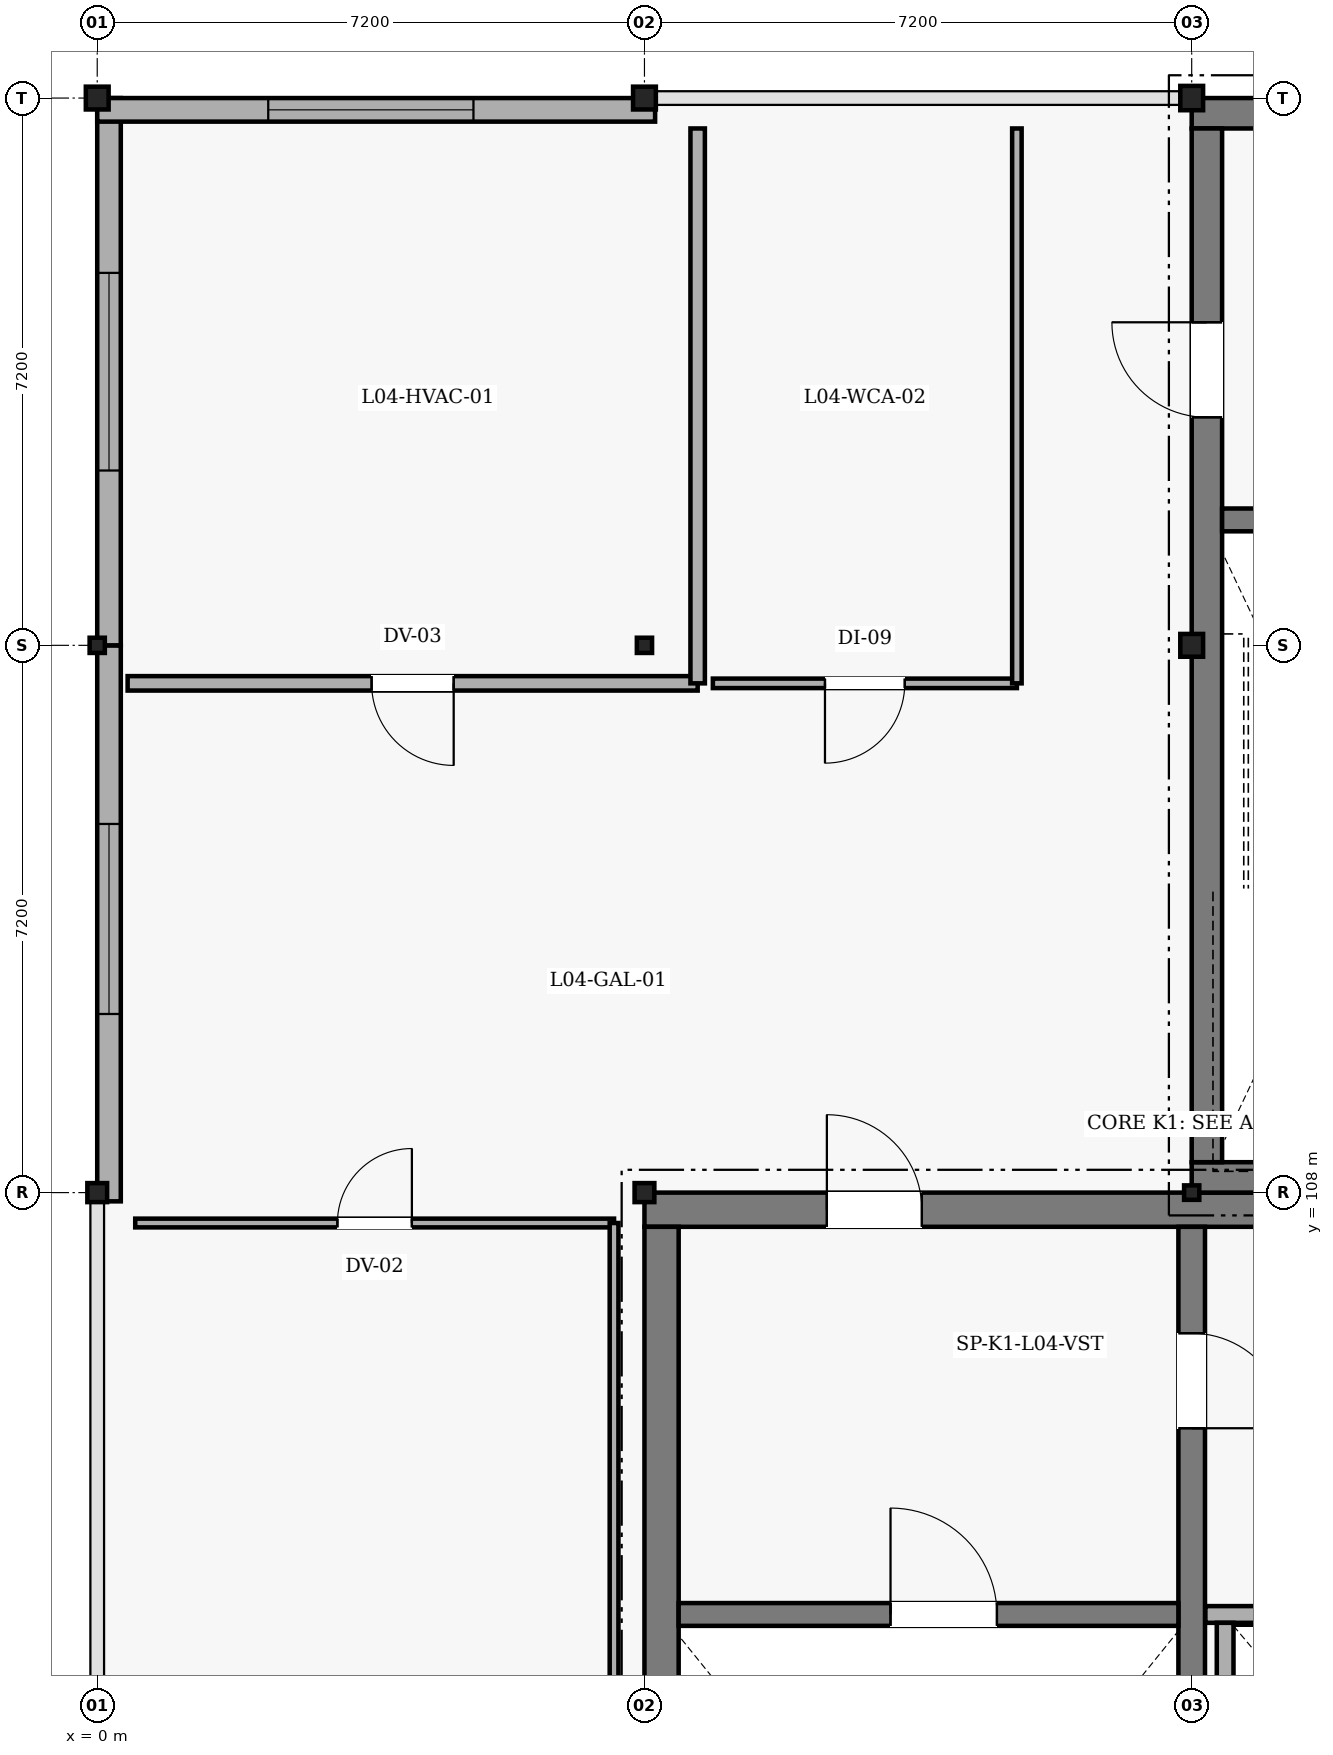
"""IFC4 building model, lengths in metres.
Left out: names, types, materials, properties, quantities, classifications, styles, units other than length and angle.
Written with IfcOpenShell. Run it as: python <this file> out.ifc"""

import sys

from ifc_helpers import new_model, si_unit, direction, frame, frame_2d, origin, origin_2d, place, context, subcontext, project, spatial, rectangle, hollow_rectangle, i_section, extrude, element, fill, save


model = new_model("IFC4")
c1 = context("Model", 3, precision=1e-05, world=origin(), true_north=direction((0.0, 1.0)))
c2 = subcontext(c1, "Body", "Model", "MODEL_VIEW")
j1 = project(units=[si_unit("LENGTHUNIT", "METRE"), si_unit("PLANEANGLEUNIT", "RADIAN")], contexts=[c1])
p1 = place(None, origin())
s1 = spatial("IfcSite", under=j1, at=p1, CompositionType="ELEMENT")
p2 = place(p1, origin())
s2 = spatial("IfcBuilding", under=s1, at=p2, CompositionType="ELEMENT")
p3 = place(p2, frame((0.0, 0.0, 18.0)))
s3 = spatial("IfcBuildingStorey", under=s2, at=p3, CompositionType="ELEMENT", Elevation=18.0)
p4 = place(p3, frame((7.2, 107.775, 0.0), z_axis=(0.0, 0.0, 1.0), x_axis=(1.0, 0.0, 0.0)))
e1 = element("IfcWall", 1, at=p4, inside=s3, PredefinedType="SHEAR", context=c2, shape_type="SweptSolid", body=[
    extrude(rectangle(XDim=14.4, YDim=0.45, at=frame_2d((7.2, 0.0))), origin(), (0.0, 0.0, 1.0), 3.6),
])
p5 = place(p4, frame((2.4, 0.0, 0.0)))
e2 = element("IfcOpeningElement", 2, at=p5, cuts=e1, PredefinedType="OPENING", context=c2, shape_type="SweptSolid", body=[
    extrude(rectangle(XDim=1.25, YDim=2.2, at=frame_2d((0.625, 1.1))), frame((0.0, 0.235, 0.0), z_axis=(0.0, -1.0, 0.0), x_axis=(1.0, 0.0, 0.0)), (0.0, 0.0, 1.0), 0.47),
])
p6 = place(p3, frame((7.425, 94.05, 0.0), z_axis=(0.0, 0.0, 1.0), x_axis=(0.0, 1.0, 0.0)))
e3 = element("IfcWall", 3, at=p6, inside=s3, PredefinedType="SHEAR", context=c2, shape_type="SweptSolid", body=[
    extrude(rectangle(XDim=13.5, YDim=0.45, at=frame_2d((6.75, 0.0))), origin(), (0.0, 0.0, 1.0), 3.6),
])
p7 = place(p3, frame((14.4, 107.55, 0.0), z_axis=(0.0, 0.0, 1.0), x_axis=(0.0, -1.0, 0.0)))
e4 = element("IfcWall", 4, at=p7, inside=s3, PredefinedType="SHEAR", context=c2, shape_type="SweptSolid", body=[
    extrude(rectangle(XDim=13.5, YDim=0.35, at=frame_2d((6.75, 0.0))), origin(), (0.0, 0.0, 1.0), 3.6),
])
p8 = place(p7, frame((1.4, 0.0, 0.0)))
e5 = element("IfcOpeningElement", 5, at=p8, cuts=e4, PredefinedType="OPENING", context=c2, shape_type="SweptSolid", body=[
    extrude(rectangle(XDim=1.25, YDim=2.2, at=frame_2d((0.625, 1.1))), frame((0.0, 0.185, 0.0), z_axis=(0.0, -1.0, 0.0), x_axis=(1.0, 0.0, 0.0)), (0.0, 0.0, 1.0), 0.37),
])
p9 = place(p3, frame((7.65, 102.45, 0.0), z_axis=(0.0, 0.0, 1.0), x_axis=(1.0, 0.0, 0.0)))
e6 = element("IfcWall", 6, at=p9, inside=s3, PredefinedType="SHEAR", context=c2, shape_type="SweptSolid", body=[
    extrude(rectangle(XDim=6.575, YDim=0.3, at=frame_2d((3.288, 0.0))), origin(), (0.0, 0.0, 1.0), 3.6),
])
p10 = place(p9, frame((2.788, 0.0, 0.0)))
e7 = element("IfcOpeningElement", 7, at=p10, cuts=e6, PredefinedType="OPENING", context=c2, shape_type="SweptSolid", body=[
    extrude(rectangle(XDim=1.4, YDim=2.2, at=frame_2d((0.7, 1.1))), frame((0.0, 0.16, 0.0), z_axis=(0.0, -1.0, 0.0), x_axis=(1.0, 0.0, 0.0)), (0.0, 0.0, 1.0), 0.32),
])
for number, where, z_axis, x_axis in (
    (8, (14.4, 122.2, 0.0), (0.0, 0.0, 1.0), (1.0, 0.0, 0.0)),
    (9, (21.6, 108.2, 0.0), (0.0, 0.0, 1.0), (-1.0, 0.0, 0.0)),
):
    element("IfcWall", number, at=place(p3, frame(where, z_axis=z_axis, x_axis=x_axis)), inside=s3, PredefinedType="SHEAR", context=c2, shape_type="SweptSolid", body=[
        extrude(rectangle(XDim=7.2, YDim=0.4, at=frame_2d((3.6, 0.0))), origin(), (0.0, 0.0, 1.0), 3.6),
    ])
p11 = place(p3, frame((14.6, 108.4, 0.0), z_axis=(0.0, 0.0, 1.0), x_axis=(0.0, 1.0, 0.0)))
e10 = element("IfcWall", 10, at=p11, inside=s3, PredefinedType="SHEAR", context=c2, shape_type="SweptSolid", body=[
    extrude(rectangle(XDim=13.6, YDim=0.4, at=frame_2d((6.8, 0.0))), origin(), (0.0, 0.0, 1.0), 3.6),
])
p12 = place(p11, frame((9.8, 0.0, 0.0)))
e11 = element("IfcOpeningElement", 11, at=p12, cuts=e10, PredefinedType="OPENING", context=c2, shape_type="SweptSolid", body=[
    extrude(rectangle(XDim=1.25, YDim=2.2, at=frame_2d((0.625, 1.1))), frame((0.0, 0.21, 0.0), z_axis=(0.0, -1.0, 0.0), x_axis=(1.0, 0.0, 0.0)), (0.0, 0.0, 1.0), 0.42),
])
p13 = place(p3, frame((14.8, 116.85, 0.0), z_axis=(0.0, 0.0, 1.0), x_axis=(1.0, 0.0, 0.0)))
e12 = element("IfcWall", 12, at=p13, inside=s3, PredefinedType="SHEAR", context=c2, shape_type="SweptSolid", body=[
    extrude(rectangle(XDim=6.4, YDim=0.3, at=frame_2d((3.2, 0.0))), origin(), (0.0, 0.0, 1.0), 3.6),
])
p14 = place(p13, frame((1.15, 0.0, 0.0)))
e13 = element("IfcOpeningElement", 13, at=p14, cuts=e12, PredefinedType="OPENING", context=c2, shape_type="SweptSolid", body=[
    extrude(rectangle(XDim=1.4, YDim=2.2, at=frame_2d((0.7, 1.1))), frame((0.0, 0.16, 0.0), z_axis=(0.0, -1.0, 0.0), x_axis=(1.0, 0.0, 0.0)), (0.0, 0.0, 1.0), 0.32),
])
p15 = place(p13, frame((4.6, 0.0, 0.0)))
e14 = element("IfcOpeningElement", 14, at=p15, cuts=e12, PredefinedType="OPENING", context=c2, shape_type="SweptSolid", body=[
    extrude(rectangle(XDim=1.2, YDim=2.15, at=frame_2d((0.6, 1.075))), frame((0.0, 0.16, 0.0), z_axis=(0.0, -1.0, 0.0), x_axis=(1.0, 0.0, 0.0)), (0.0, 0.0, 1.0), 0.32),
])
p16 = place(p3, frame((0.0, 108.0, 0.0), z_axis=(0.0, 0.0, 1.0), x_axis=(1.0, 0.0, 0.0)))
e15 = element("IfcColumn", 15, at=p16, inside=s3, PredefinedType="COLUMN", context=c2, shape_type="SweptSolid", body=[
    extrude(i_section(OverallWidth=0.26, OverallDepth=0.25, WebThickness=0.008, FlangeThickness=0.012, FilletRadius=0.024, at=origin_2d()), origin(), (0.0, 0.0, 1.0), 3.3),
])
p17 = place(p3, frame((0.0, 115.2, 0.0), z_axis=(0.0, 0.0, 1.0), x_axis=(1.0, 0.0, 0.0)))
e16 = element("IfcColumn", 16, at=p17, inside=s3, PredefinedType="COLUMN", context=c2, shape_type="SweptSolid", body=[
    extrude(i_section(OverallWidth=0.2, OverallDepth=0.2, WebThickness=0.009, FlangeThickness=0.015, FilletRadius=0.018, at=origin_2d()), origin(), (0.0, 0.0, 1.0), 3.3),
])
p18 = place(p3, frame((0.0, 122.4, 0.0), z_axis=(0.0, 0.0, 1.0), x_axis=(1.0, 0.0, 0.0)))
e17 = element("IfcColumn", 17, at=p18, inside=s3, PredefinedType="COLUMN", context=c2, shape_type="SweptSolid", body=[
    extrude(hollow_rectangle(XDim=0.3, YDim=0.3, WallThickness=0.012, at=origin_2d()), origin(), (0.0, 0.0, 1.0), 3.3),
])
p19 = place(p3, frame((7.2, 108.0, 0.0), z_axis=(0.0, 0.0, 1.0), x_axis=(1.0, 0.0, 0.0)))
e18 = element("IfcColumn", 18, at=p19, inside=s3, PredefinedType="COLUMN", context=c2, shape_type="SweptSolid", body=[
    extrude(i_section(OverallWidth=0.26, OverallDepth=0.25, WebThickness=0.008, FlangeThickness=0.012, FilletRadius=0.024, at=origin_2d()), origin(), (0.0, 0.0, 1.0), 3.3),
])
p20 = place(p3, frame((7.2, 115.2, 0.0), z_axis=(0.0, 0.0, 1.0), x_axis=(1.0, 0.0, 0.0)))
e19 = element("IfcColumn", 19, at=p20, inside=s3, PredefinedType="COLUMN", context=c2, shape_type="SweptSolid", body=[
    extrude(i_section(OverallWidth=0.2, OverallDepth=0.2, WebThickness=0.009, FlangeThickness=0.015, FilletRadius=0.018, at=origin_2d()), origin(), (0.0, 0.0, 1.0), 3.3),
])
p21 = place(p3, frame((7.2, 122.4, 0.0), z_axis=(0.0, 0.0, 1.0), x_axis=(1.0, 0.0, 0.0)))
e20 = element("IfcColumn", 20, at=p21, inside=s3, PredefinedType="COLUMN", context=c2, shape_type="SweptSolid", body=[
    extrude(hollow_rectangle(XDim=0.3, YDim=0.3, WallThickness=0.012, at=origin_2d()), origin(), (0.0, 0.0, 1.0), 3.3),
])
p22 = place(p3, frame((14.4, 108.0, 0.0), z_axis=(0.0, 0.0, 1.0), x_axis=(1.0, 0.0, 0.0)))
e21 = element("IfcColumn", 21, at=p22, inside=s3, PredefinedType="COLUMN", context=c2, shape_type="SweptSolid", body=[
    extrude(i_section(OverallWidth=0.2, OverallDepth=0.19, WebThickness=0.007, FlangeThickness=0.01, FilletRadius=0.018, at=origin_2d()), origin(), (0.0, 0.0, 1.0), 3.3),
])
p23 = place(p3, frame((14.4, 115.2, 0.0), z_axis=(0.0, 0.0, 1.0), x_axis=(1.0, 0.0, 0.0)))
e22 = element("IfcColumn", 22, at=p23, inside=s3, PredefinedType="COLUMN", context=c2, shape_type="SweptSolid", body=[
    extrude(hollow_rectangle(XDim=0.3, YDim=0.3, WallThickness=0.012, at=origin_2d()), origin(), (0.0, 0.0, 1.0), 3.3),
])
p24 = place(p3, frame((14.4, 122.4, 0.0), z_axis=(0.0, 0.0, 1.0), x_axis=(1.0, 0.0, 0.0)))
e23 = element("IfcColumn", 23, at=p24, inside=s3, PredefinedType="COLUMN", context=c2, shape_type="SweptSolid", body=[
    extrude(i_section(OverallWidth=0.3, OverallDepth=0.32, WebThickness=0.011, FlangeThickness=0.021, FilletRadius=0.027, at=origin_2d()), origin(), (0.0, 0.0, 1.0), 3.3),
])
p25 = place(p3, frame((0.155, 107.885, 0.0), z_axis=(0.0, 0.0, 1.0), x_axis=(0.0, 1.0, 0.0)))
e24 = element("IfcWall", 24, at=p25, inside=s3, PredefinedType="SOLIDWALL", context=c2, shape_type="SweptSolid", body=[
    extrude(rectangle(XDim=7.315, YDim=0.31, at=frame_2d((3.657, 0.0))), origin(), (0.0, 0.0, 1.0), 3.0),
])
p26 = place(p25, frame((2.465, 0.0, 0.9)))
e25 = element("IfcOpeningElement", 25, at=p26, cuts=e24, PredefinedType="OPENING", context=c2, shape_type="SweptSolid", body=[
    extrude(rectangle(XDim=2.5, YDim=1.75, at=frame_2d((1.25, 0.875))), frame((0.0, 0.165, 0.0), z_axis=(0.0, -1.0, 0.0), x_axis=(1.0, 0.0, 0.0)), (0.0, 0.0, 1.0), 0.33),
])
p27 = place(p3, frame((0.155, 115.2, 0.0), z_axis=(0.0, 0.0, 1.0), x_axis=(0.0, 1.0, 0.0)))
e26 = element("IfcWall", 26, at=p27, inside=s3, PredefinedType="SOLIDWALL", context=c2, shape_type="SweptSolid", body=[
    extrude(rectangle(XDim=7.2, YDim=0.31, at=frame_2d((3.6, 0.0))), origin(), (0.0, 0.0, 1.0), 3.0),
])
p28 = place(p27, frame((2.3, 0.0, 0.9)))
e27 = element("IfcOpeningElement", 27, at=p28, cuts=e26, PredefinedType="OPENING", context=c2, shape_type="SweptSolid", body=[
    extrude(rectangle(XDim=2.6, YDim=1.8, at=frame_2d((1.3, 0.9))), frame((0.0, 0.165, 0.0), z_axis=(0.0, -1.0, 0.0), x_axis=(1.0, 0.0, 0.0)), (0.0, 0.0, 1.0), 0.33),
])
p29 = place(p3, frame((0.0, 122.245, 0.0), z_axis=(0.0, 0.0, 1.0), x_axis=(1.0, 0.0, 0.0)))
e28 = element("IfcWall", 28, at=p29, inside=s3, PredefinedType="SOLIDWALL", context=c2, shape_type="SweptSolid", body=[
    extrude(rectangle(XDim=7.34, YDim=0.31, at=frame_2d((3.67, 0.0))), origin(), (0.0, 0.0, 1.0), 3.0),
])
p30 = place(p29, frame((2.25, 0.0, 0.9)))
e29 = element("IfcOpeningElement", 29, at=p30, cuts=e28, PredefinedType="OPENING", context=c2, shape_type="SweptSolid", body=[
    extrude(rectangle(XDim=2.7, YDim=1.65, at=frame_2d((1.35, 0.825))), frame((0.0, 0.165, 0.0), z_axis=(0.0, -1.0, 0.0), x_axis=(1.0, 0.0, 0.0)), (0.0, 0.0, 1.0), 0.33),
])
p31 = place(p3, frame((14.58, 102.45, 0.0), z_axis=(0.0, 0.0, 1.0), x_axis=(1.0, 0.0, 0.0)))
e30 = element("IfcWall", 30, at=p31, inside=s3, PredefinedType="PARTITIONING", context=c2, shape_type="SweptSolid", body=[
    extrude(rectangle(XDim=6.57, YDim=0.22, at=frame_2d((3.285, 0.0))), origin(), (0.0, 0.0, 1.0), 3.25),
])
p32 = place(p31, frame((1.02, 0.0, 0.0)))
e31 = element("IfcOpeningElement", 31, at=p32, cuts=e30, PredefinedType="OPENING", context=c2, shape_type="SweptSolid", body=[
    extrude(rectangle(XDim=1.1, YDim=2.15, at=frame_2d((0.55, 1.075))), frame((0.0, 0.12, 0.0), z_axis=(0.0, -1.0, 0.0), x_axis=(1.0, 0.0, 0.0)), (0.0, 0.0, 1.0), 0.24),
])
p33 = place(p31, frame((4.07, 0.0, 0.0)))
e32 = element("IfcOpeningElement", 32, at=p33, cuts=e30, PredefinedType="OPENING", context=c2, shape_type="SweptSolid", body=[
    extrude(rectangle(XDim=1.2, YDim=2.15, at=frame_2d((0.6, 1.075))), frame((0.0, 0.12, 0.0), z_axis=(0.0, -1.0, 0.0), x_axis=(1.0, 0.0, 0.0)), (0.0, 0.0, 1.0), 0.24),
])
p34 = place(p3, frame((14.84, 99.34, 0.0), z_axis=(0.0, 0.0, 1.0), x_axis=(0.0, 1.0, 0.0)))
e33 = element("IfcWall", 33, at=p34, inside=s3, PredefinedType="PARTITIONING", context=c2, shape_type="SweptSolid", body=[
    extrude(rectangle(XDim=3.0, YDim=0.22, at=frame_2d((1.5, 0.0))), origin(), (0.0, 0.0, 1.0), 3.25),
])
p35 = place(p3, frame((0.5, 107.6, 0.0), z_axis=(0.0, 0.0, 1.0), x_axis=(1.0, 0.0, 0.0)))
e34 = element("IfcWall", 34, at=p35, inside=s3, PredefinedType="PARTITIONING", context=c2, shape_type="SweptSolid", body=[
    extrude(rectangle(XDim=6.3, YDim=0.115, at=frame_2d((3.15, 0.0))), origin(), (0.0, 0.0, 1.0), 3.25),
])
p36 = place(p35, frame((2.66, 0.0, 0.0)))
e35 = element("IfcOpeningElement", 35, at=p36, cuts=e34, PredefinedType="OPENING", context=c2, shape_type="SweptSolid", body=[
    extrude(rectangle(XDim=0.98, YDim=2.15, at=frame_2d((0.49, 1.075))), frame((0.0, 0.067, 0.0), z_axis=(0.0, -1.0, 0.0), x_axis=(1.0, 0.0, 0.0)), (0.0, 0.0, 1.0), 0.135),
])
p37 = place(p3, frame((6.8, 107.6, 0.0), z_axis=(0.0, 0.0, 1.0), x_axis=(0.0, -1.0, 0.0)))
e36 = element("IfcWall", 36, at=p37, inside=s3, PredefinedType="PARTITIONING", context=c2, shape_type="SweptSolid", body=[
    extrude(rectangle(XDim=13.5, YDim=0.115, at=frame_2d((6.75, 0.0))), origin(), (0.0, 0.0, 1.0), 2.85),
])
p38 = place(p3, frame((7.9, 114.7, 0.0), z_axis=(0.0, 0.0, 1.0), x_axis=(-1.0, 0.0, 0.0)))
e37 = element("IfcWall", 37, at=p38, inside=s3, PredefinedType="PARTITIONING", context=c2, shape_type="SweptSolid", body=[
    extrude(rectangle(XDim=7.5, YDim=0.19, at=frame_2d((3.75, 0.0))), origin(), (0.0, 0.0, 1.0), 2.85),
])
p39 = place(p38, frame((3.21, 0.0, 0.0)))
e38 = element("IfcOpeningElement", 38, at=p39, cuts=e37, PredefinedType="OPENING", context=c2, shape_type="SweptSolid", body=[
    extrude(rectangle(XDim=1.08, YDim=2.15, at=frame_2d((0.54, 1.075))), frame((0.0, 0.105, 0.0), z_axis=(0.0, -1.0, 0.0), x_axis=(1.0, 0.0, 0.0)), (0.0, 0.0, 1.0), 0.21),
])
p40 = place(p3, frame((7.9, 122.0, 0.0), z_axis=(0.0, 0.0, 1.0), x_axis=(0.0, -1.0, 0.0)))
e39 = element("IfcWall", 39, at=p40, inside=s3, PredefinedType="PARTITIONING", context=c2, shape_type="SweptSolid", body=[
    extrude(rectangle(XDim=7.3, YDim=0.19, at=frame_2d((3.65, 0.0))), origin(), (0.0, 0.0, 1.0), 2.85),
])
p41 = place(p3, frame((12.1, 114.7, 0.0), z_axis=(0.0, 0.0, 1.0), x_axis=(-1.0, 0.0, 0.0)))
e40 = element("IfcWall", 40, at=p41, inside=s3, PredefinedType="PARTITIONING", context=c2, shape_type="SweptSolid", body=[
    extrude(rectangle(XDim=4.0, YDim=0.125, at=frame_2d((2.0, 0.0))), origin(), (0.0, 0.0, 1.0), 3.25),
])
p42 = place(p41, frame((1.475, 0.0, 0.0)))
e41 = element("IfcOpeningElement", 41, at=p42, cuts=e40, PredefinedType="OPENING", context=c2, shape_type="SweptSolid", body=[
    extrude(rectangle(XDim=1.05, YDim=2.1, at=frame_2d((0.525, 1.05))), frame((0.0, 0.073, 0.0), z_axis=(0.0, -1.0, 0.0), x_axis=(1.0, 0.0, 0.0)), (0.0, 0.0, 1.0), 0.145),
])
p43 = place(p3, frame((12.1, 122.0, 0.0), z_axis=(0.0, 0.0, 1.0), x_axis=(0.0, -1.0, 0.0)))
e42 = element("IfcWall", 42, at=p43, inside=s3, PredefinedType="PARTITIONING", context=c2, shape_type="SweptSolid", body=[
    extrude(rectangle(XDim=7.3, YDim=0.125, at=frame_2d((3.65, 0.0))), origin(), (0.0, 0.0, 1.0), 2.85),
])
p44 = place(p26, origin())
e43 = element("IfcWindow", 43, at=p44, inside=s3, PartitioningType="SINGLE_PANEL", PredefinedType="WINDOW", context=c2, shape_type="SweptSolid", body=[
    extrude(rectangle(XDim=2.5, YDim=1.75, at=frame_2d((1.25, 0.875))), frame((0.0, 0.03, 0.0), z_axis=(0.0, -1.0, 0.0), x_axis=(1.0, 0.0, 0.0)), (0.0, 0.0, 1.0), 0.06),
])
fill(e25, e43)
p45 = place(p28, origin())
e44 = element("IfcWindow", 44, at=p45, inside=s3, PartitioningType="SINGLE_PANEL", PredefinedType="WINDOW", context=c2, shape_type="SweptSolid", body=[
    extrude(rectangle(XDim=2.6, YDim=1.8, at=frame_2d((1.3, 0.9))), frame((0.0, 0.03, 0.0), z_axis=(0.0, -1.0, 0.0), x_axis=(1.0, 0.0, 0.0)), (0.0, 0.0, 1.0), 0.06),
])
fill(e27, e44)
p46 = place(p30, origin())
e45 = element("IfcWindow", 45, at=p46, inside=s3, PartitioningType="SINGLE_PANEL", PredefinedType="WINDOW", context=c2, shape_type="SweptSolid", body=[
    extrude(rectangle(XDim=2.7, YDim=1.65, at=frame_2d((1.35, 0.825))), frame((0.0, 0.03, 0.0), z_axis=(0.0, -1.0, 0.0), x_axis=(1.0, 0.0, 0.0)), (0.0, 0.0, 1.0), 0.06),
])
fill(e29, e45)
p47 = place(p10, origin())
e46 = element("IfcDoor", 46, at=p47, inside=s3, OperationType="SINGLE_SWING_LEFT", PredefinedType="DOOR", context=c2, shape_type="SweptSolid", body=[
    extrude(rectangle(XDim=1.4, YDim=2.2, at=frame_2d((0.7, 1.1))), frame((0.0, 0.025, 0.0), z_axis=(0.0, -1.0, 0.0), x_axis=(1.0, 0.0, 0.0)), (0.0, 0.0, 1.0), 0.05),
])
fill(e7, e46)
p48 = place(p8, origin())
e47 = element("IfcDoor", 47, at=p48, inside=s3, OperationType="SINGLE_SWING_RIGHT", PredefinedType="DOOR", context=c2, shape_type="SweptSolid", body=[
    extrude(rectangle(XDim=1.25, YDim=2.2, at=frame_2d((0.625, 1.1))), frame((0.0, 0.025, 0.0), z_axis=(0.0, -1.0, 0.0), x_axis=(1.0, 0.0, 0.0)), (0.0, 0.0, 1.0), 0.05),
])
fill(e5, e47)
p49 = place(p5, origin())
e48 = element("IfcDoor", 48, at=p49, inside=s3, OperationType="SINGLE_SWING_LEFT", PredefinedType="DOOR", context=c2, shape_type="SweptSolid", body=[
    extrude(rectangle(XDim=1.25, YDim=2.2, at=frame_2d((0.625, 1.1))), frame((0.0, 0.025, 0.0), z_axis=(0.0, -1.0, 0.0), x_axis=(1.0, 0.0, 0.0)), (0.0, 0.0, 1.0), 0.05),
])
fill(e2, e48)
p50 = place(p12, origin())
e49 = element("IfcDoor", 49, at=p50, inside=s3, OperationType="SINGLE_SWING_RIGHT", PredefinedType="DOOR", context=c2, shape_type="SweptSolid", body=[
    extrude(rectangle(XDim=1.25, YDim=2.2, at=frame_2d((0.625, 1.1))), frame((0.0, 0.025, 0.0), z_axis=(0.0, -1.0, 0.0), x_axis=(1.0, 0.0, 0.0)), (0.0, 0.0, 1.0), 0.05),
])
fill(e11, e49)
p51 = place(p36, origin())
e50 = element("IfcDoor", 50, at=p51, inside=s3, OperationType="SINGLE_SWING_RIGHT", PredefinedType="DOOR", context=c2, shape_type="SweptSolid", body=[
    extrude(rectangle(XDim=0.98, YDim=2.15, at=frame_2d((0.49, 1.075))), frame((0.0, 0.025, 0.0), z_axis=(0.0, -1.0, 0.0), x_axis=(1.0, 0.0, 0.0)), (0.0, 0.0, 1.0), 0.05),
])
fill(e35, e50)
p52 = place(p39, origin())
e51 = element("IfcDoor", 51, at=p52, inside=s3, OperationType="SINGLE_SWING_LEFT", PredefinedType="DOOR", context=c2, shape_type="SweptSolid", body=[
    extrude(rectangle(XDim=1.08, YDim=2.15, at=frame_2d((0.54, 1.075))), frame((0.0, 0.025, 0.0), z_axis=(0.0, -1.0, 0.0), x_axis=(1.0, 0.0, 0.0)), (0.0, 0.0, 1.0), 0.05),
])
fill(e38, e51)
p53 = place(p42, origin())
e52 = element("IfcDoor", 52, at=p53, inside=s3, OperationType="SINGLE_SWING_RIGHT", PredefinedType="DOOR", context=c2, shape_type="SweptSolid", body=[
    extrude(rectangle(XDim=1.05, YDim=2.1, at=frame_2d((0.525, 1.05))), frame((0.0, 0.025, 0.0), z_axis=(0.0, -1.0, 0.0), x_axis=(1.0, 0.0, 0.0)), (0.0, 0.0, 1.0), 0.05),
])
fill(e41, e52)
save(model, sys.argv[1])
